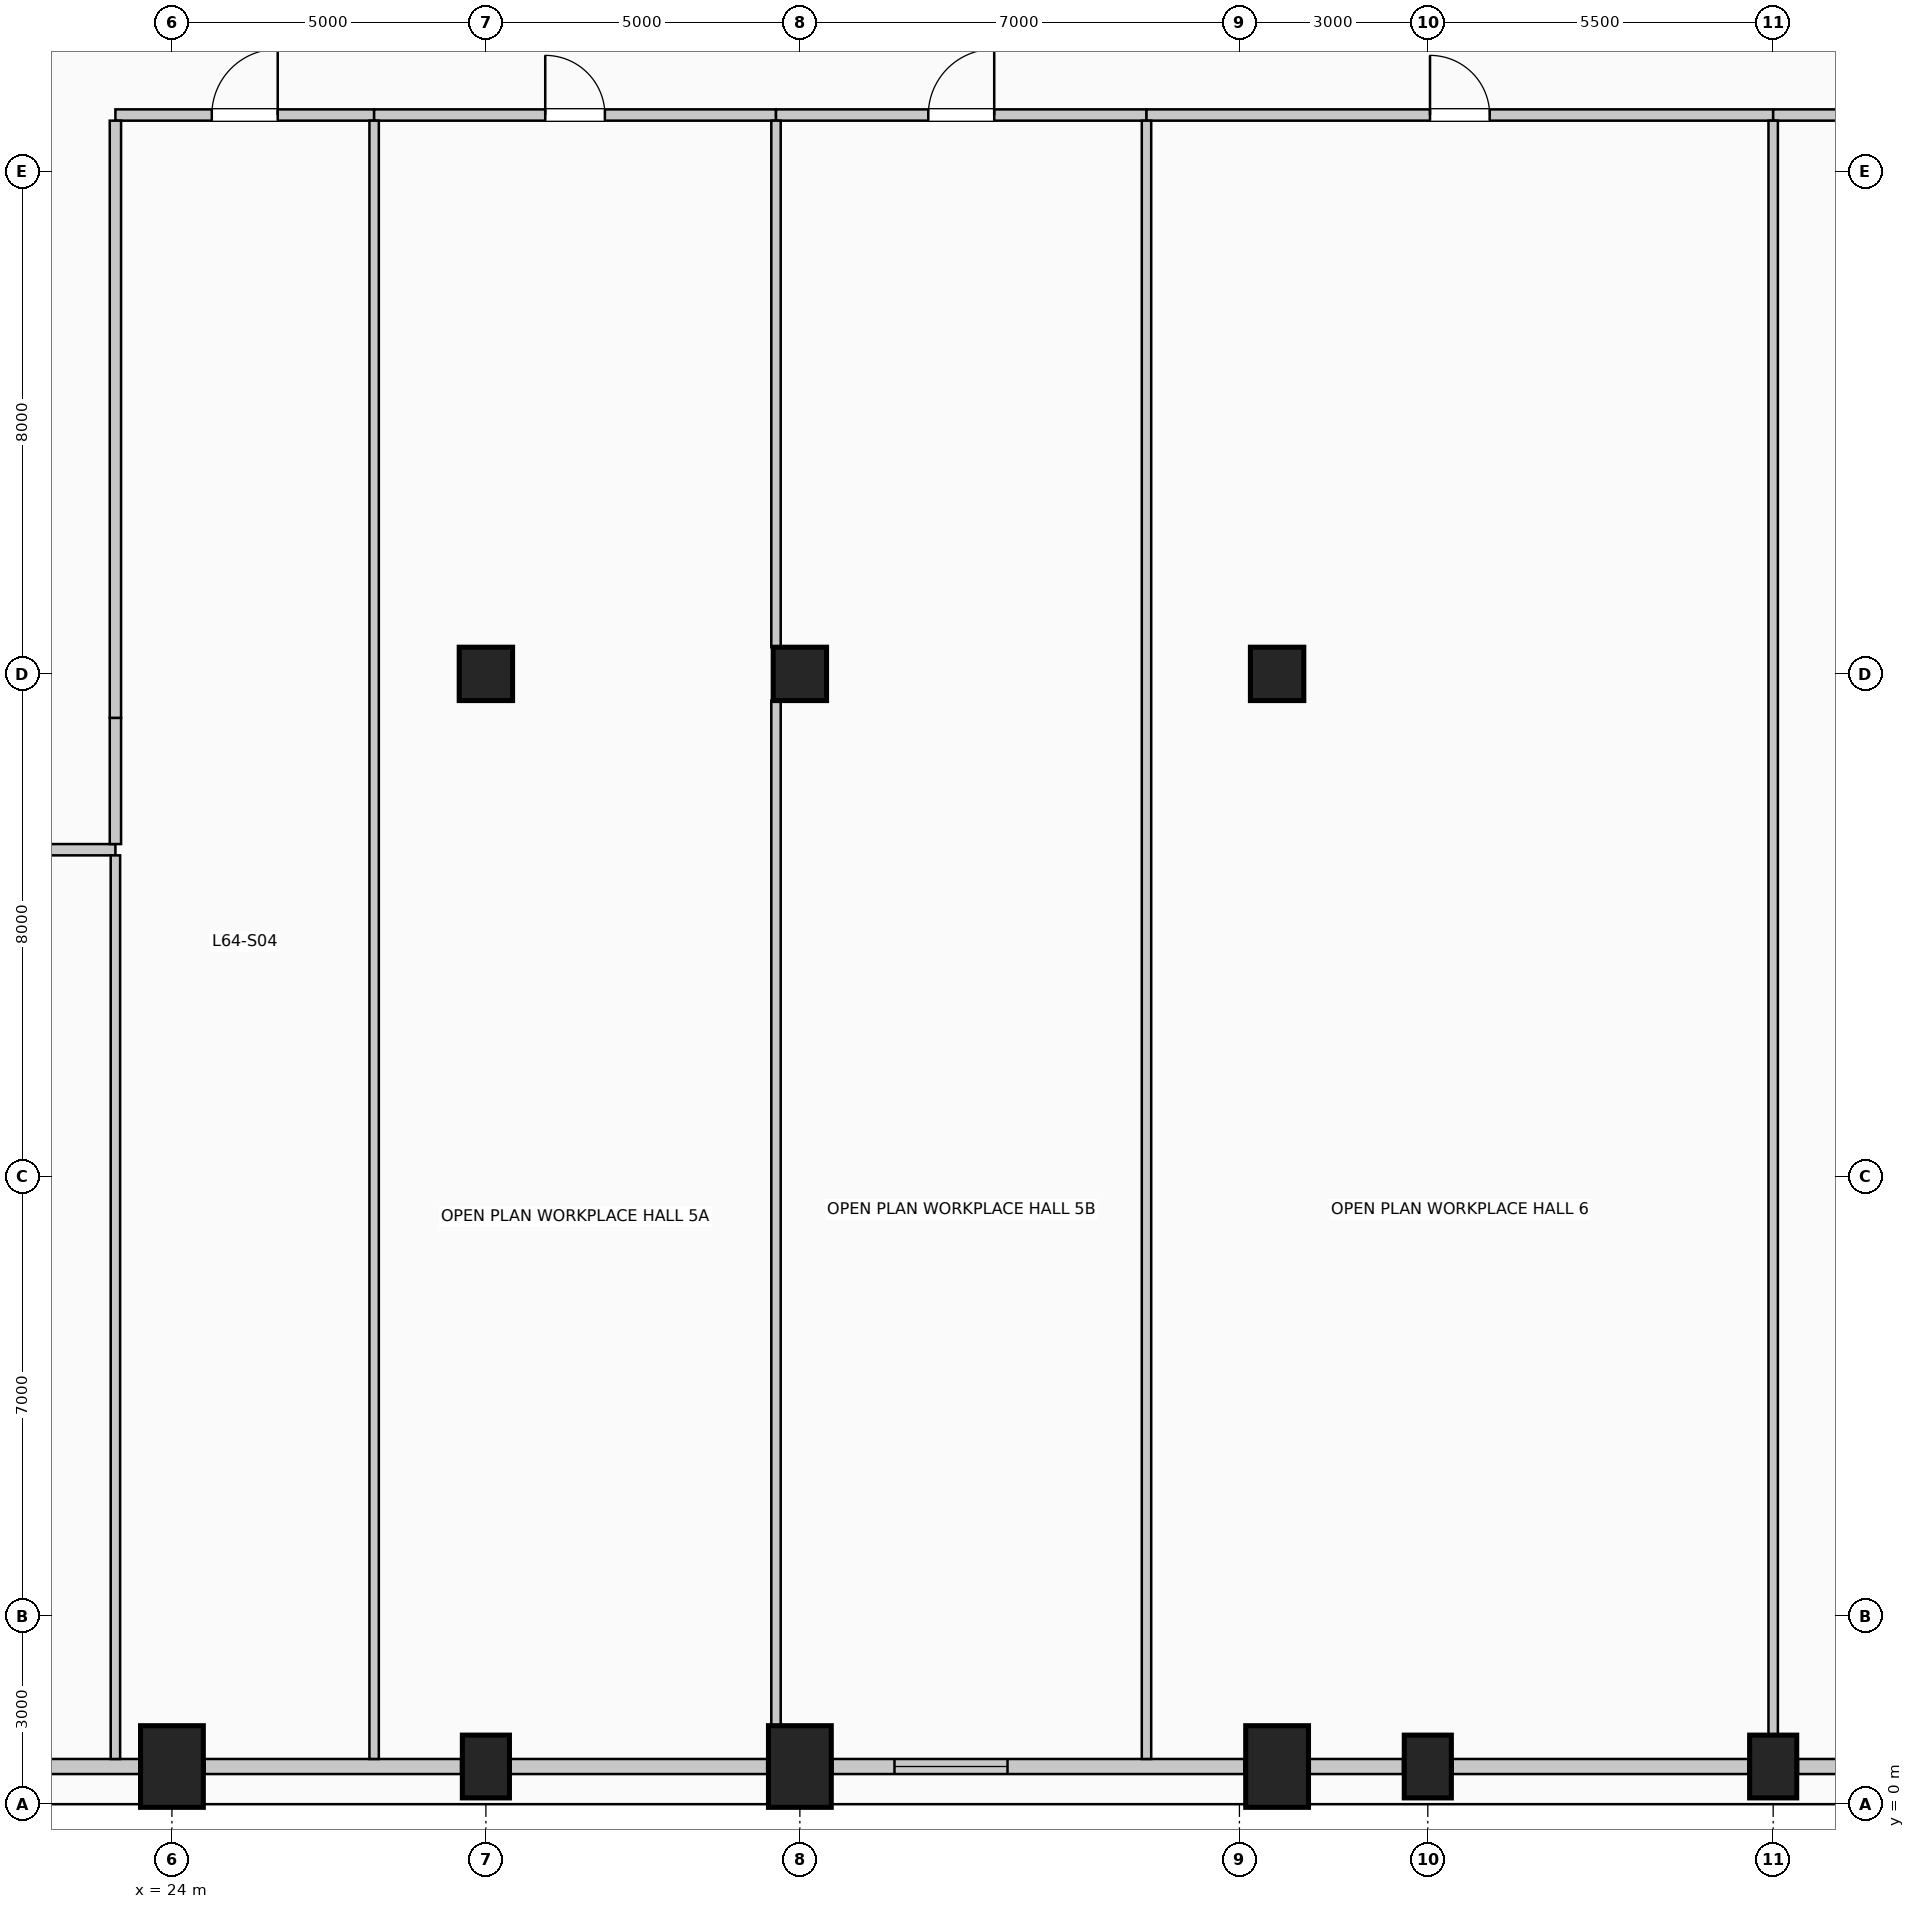
"""IFC4 building model, lengths in metres.
Left out: names, types, materials, properties, quantities, classifications, styles, units other than length and angle.
Written with IfcOpenShell. Run it as: python <this file> out.ifc"""

import sys

from ifc_helpers import new_model, si_unit, direction, frame, frame_2d, origin, origin_2d, place, context, subcontext, project, spatial, rectangle, circle, extrude, element, fill, save


model = new_model("IFC4")
c1 = context("Model", 3, precision=1e-05, world=origin(), true_north=direction((0.0, 1.0)))
c2 = subcontext(c1, "Body", "Model", "MODEL_VIEW")
j1 = project(units=[si_unit("LENGTHUNIT", "METRE"), si_unit("PLANEANGLEUNIT", "RADIAN")], contexts=[c1])
p1 = place(None, origin())
s1 = spatial("IfcSite", under=j1, at=p1, CompositionType="ELEMENT")
p2 = place(p1, origin())
s2 = spatial("IfcBuilding", under=s1, at=p2, CompositionType="ELEMENT")
p3 = place(p2, frame((0.0, 0.0, 264.6)))
s3 = spatial("IfcBuildingStorey", under=s2, at=p3, CompositionType="ELEMENT", Elevation=264.6)
p4 = place(p3, frame((24.0, 0.6, 0.0), z_axis=(0.0, 0.0, 1.0), x_axis=(1.0, 0.0, 0.0)))
e1 = element("IfcColumn", 1, at=p4, inside=s3, PredefinedType="COLUMN", context=c2, shape_type="SweptSolid", body=[
    extrude(rectangle(XDim=1.0, YDim=1.3, at=origin_2d()), origin(), (0.0, 0.0, 1.0), 4.0),
])
p5 = place(p3, frame((29.0, 0.6, 0.0), z_axis=(0.0, 0.0, 1.0), x_axis=(1.0, 0.0, 0.0)))
e2 = element("IfcColumn", 2, at=p5, inside=s3, PredefinedType="COLUMN", context=c2, shape_type="SweptSolid", body=[
    extrude(rectangle(XDim=0.75, YDim=1.0, at=origin_2d()), origin(), (0.0, 0.0, 1.0), 4.0),
])
for number, where, z_axis, x_axis in (
    (3, (34.0, 0.6, 0.0), (0.0, 0.0, 1.0), (1.0, 0.0, 0.0)),
    (4, (41.6, 0.6, 0.0), (0.0, 0.0, 1.0), (1.0, 0.0, 0.0)),
):
    element("IfcColumn", number, at=place(p3, frame(where, z_axis=z_axis, x_axis=x_axis)), inside=s3, PredefinedType="COLUMN", context=c2, shape_type="SweptSolid", body=[
        extrude(rectangle(XDim=1.0, YDim=1.3, at=origin_2d()), origin(), (0.0, 0.0, 1.0), 4.0),
    ])
for number, where, z_axis, x_axis in (
    (5, (44.0, 0.6, 0.0), (0.0, 0.0, 1.0), (1.0, 0.0, 0.0)),
    (6, (49.5, 0.6, 0.0), (0.0, 0.0, 1.0), (1.0, 0.0, 0.0)),
):
    element("IfcColumn", number, at=place(p3, frame(where, z_axis=z_axis, x_axis=x_axis)), inside=s3, PredefinedType="COLUMN", context=c2, shape_type="SweptSolid", body=[
        extrude(rectangle(XDim=0.75, YDim=1.0, at=origin_2d()), origin(), (0.0, 0.0, 1.0), 4.0),
    ])
for number, where, z_axis, x_axis in (
    (7, (29.0, 18.0, 0.0), (0.0, 0.0, 1.0), (1.0, 0.0, 0.0)),
    (8, (41.6, 18.0, 0.0), (0.0, 0.0, 1.0), (1.0, 0.0, 0.0)),
    (9, (34.0, 18.0, 0.0), (0.0, 0.0, 1.0), (1.0, 0.0, 0.0)),
):
    element("IfcColumn", number, at=place(p3, frame(where, z_axis=z_axis, x_axis=x_axis)), inside=s3, PredefinedType="COLUMN", context=c2, shape_type="SweptSolid", body=[
        extrude(circle(Radius=0.425, at=origin_2d()), origin(), (0.0, 0.0, 1.0), 4.0),
    ])
p6 = place(p3, frame((23.48, 0.6, 0.0), z_axis=(0.0, 0.0, 1.0), x_axis=(-1.0, 0.0, 0.0)))
e10 = element("IfcWall", 10, at=p6, inside=s3, PredefinedType="SOLIDWALL", context=c2, shape_type="SweptSolid", body=[
    extrude(rectangle(XDim=6.56, YDim=0.24, at=frame_2d((3.28, 0.0))), origin(), (0.0, 0.0, 1.0), 3.0),
])
p7 = place(p6, frame((3.773, 0.0, 0.42)))
e11 = element("IfcOpeningElement", 11, at=p7, cuts=e10, PredefinedType="OPENING", context=c2, shape_type="SweptSolid", body=[
    extrude(rectangle(XDim=1.8, YDim=2.2, at=frame_2d((0.9, 1.1))), frame((0.0, 0.13, 0.0), z_axis=(0.0, -1.0, 0.0), x_axis=(1.0, 0.0, 0.0)), (0.0, 0.0, 1.0), 0.26),
])
for number, where, z_axis, x_axis in (
    (12, (28.605, 0.6, 0.0), (0.0, 0.0, 1.0), (-1.0, 0.0, 0.0)),
    (13, (33.48, 0.6, 0.0), (0.0, 0.0, 1.0), (-1.0, 0.0, 0.0)),
):
    element("IfcWall", number, at=place(p3, frame(where, z_axis=z_axis, x_axis=x_axis)), inside=s3, PredefinedType="SOLIDWALL", context=c2, shape_type="SweptSolid", body=[
        extrude(rectangle(XDim=4.085, YDim=0.24, at=frame_2d((2.042, 0.0))), origin(), (0.0, 0.0, 1.0), 3.0),
    ])
p8 = place(p3, frame((41.08, 0.6, 0.0), z_axis=(0.0, 0.0, 1.0), x_axis=(-1.0, 0.0, 0.0)))
e14 = element("IfcWall", 14, at=p8, inside=s3, PredefinedType="SOLIDWALL", context=c2, shape_type="SweptSolid", body=[
    extrude(rectangle(XDim=6.56, YDim=0.24, at=frame_2d((3.28, 0.0))), origin(), (0.0, 0.0, 1.0), 3.0),
])
p9 = place(p8, frame((3.773, 0.0, 0.42)))
e15 = element("IfcOpeningElement", 15, at=p9, cuts=e14, PredefinedType="OPENING", context=c2, shape_type="SweptSolid", body=[
    extrude(rectangle(XDim=1.8, YDim=2.2, at=frame_2d((0.9, 1.1))), frame((0.0, 0.13, 0.0), z_axis=(0.0, -1.0, 0.0), x_axis=(1.0, 0.0, 0.0)), (0.0, 0.0, 1.0), 0.26),
])
p10 = place(p3, frame((43.605, 0.6, 0.0), z_axis=(0.0, 0.0, 1.0), x_axis=(-1.0, 0.0, 0.0)))
e16 = element("IfcWall", 16, at=p10, inside=s3, PredefinedType="SOLIDWALL", context=c2, shape_type="SweptSolid", body=[
    extrude(rectangle(XDim=1.485, YDim=0.24, at=frame_2d((0.742, 0.0))), origin(), (0.0, 0.0, 1.0), 3.0),
])
p11 = place(p3, frame((49.105, 0.6, 0.0), z_axis=(0.0, 0.0, 1.0), x_axis=(-1.0, 0.0, 0.0)))
e17 = element("IfcWall", 17, at=p11, inside=s3, PredefinedType="SOLIDWALL", context=c2, shape_type="SweptSolid", body=[
    extrude(rectangle(XDim=4.71, YDim=0.24, at=frame_2d((2.355, 0.0))), origin(), (0.0, 0.0, 1.0), 3.0),
])
p12 = place(p3, frame((54.005, 0.6, 0.0), z_axis=(0.0, 0.0, 1.0), x_axis=(-1.0, 0.0, 0.0)))
e18 = element("IfcWall", 18, at=p12, inside=s3, PredefinedType="SOLIDWALL", context=c2, shape_type="SweptSolid", body=[
    extrude(rectangle(XDim=4.11, YDim=0.24, at=frame_2d((2.055, 0.0))), origin(), (0.0, 0.0, 1.0), 3.0),
])
p13 = place(p12, frame((1.155, 0.0, 0.42)))
e19 = element("IfcOpeningElement", 19, at=p13, cuts=e18, PredefinedType="OPENING", context=c2, shape_type="SweptSolid", body=[
    extrude(rectangle(XDim=1.8, YDim=2.2, at=frame_2d((0.9, 1.1))), frame((0.0, 0.13, 0.0), z_axis=(0.0, -1.0, 0.0), x_axis=(1.0, 0.0, 0.0)), (0.0, 0.0, 1.0), 0.26),
])
p14 = place(p3, frame((16.4, 15.2, 0.0), z_axis=(0.0, 0.0, 1.0), x_axis=(1.0, 0.0, 0.0)))
e20 = element("IfcWall", 20, at=p14, inside=s3, PredefinedType="PARTITIONING", context=c2, shape_type="SweptSolid", body=[
    extrude(rectangle(XDim=6.7, YDim=0.18, at=frame_2d((3.35, 0.0))), origin(), (0.0, 0.0, 1.0), 3.75),
])
p15 = place(p14, frame((2.875, 0.0, 0.0)))
e21 = element("IfcOpeningElement", 21, at=p15, cuts=e20, PredefinedType="OPENING", context=c2, shape_type="SweptSolid", body=[
    extrude(rectangle(XDim=0.95, YDim=2.15, at=frame_2d((0.475, 1.075))), frame((0.0, 0.1, 0.0), z_axis=(0.0, -1.0, 0.0), x_axis=(1.0, 0.0, 0.0)), (0.0, 0.0, 1.0), 0.2),
])
p16 = place(p3, frame((23.1, 26.9, 0.0), z_axis=(0.0, 0.0, 1.0), x_axis=(1.0, 0.0, 0.0)))
e22 = element("IfcWall", 22, at=p16, inside=s3, PredefinedType="PARTITIONING", context=c2, shape_type="SweptSolid", body=[
    extrude(rectangle(XDim=4.12, YDim=0.18, at=frame_2d((2.06, 0.0))), origin(), (0.0, 0.0, 1.0), 3.75),
])
p17 = place(p16, frame((1.535, 0.0, 0.0)))
e23 = element("IfcOpeningElement", 23, at=p17, cuts=e22, PredefinedType="OPENING", context=c2, shape_type="SweptSolid", body=[
    extrude(rectangle(XDim=1.05, YDim=2.15, at=frame_2d((0.525, 1.075))), frame((0.0, 0.1, 0.0), z_axis=(0.0, -1.0, 0.0), x_axis=(1.0, 0.0, 0.0)), (0.0, 0.0, 1.0), 0.2),
])
p18 = place(p3, frame((27.22, 26.9, 0.0), z_axis=(0.0, 0.0, 1.0), x_axis=(1.0, 0.0, 0.0)))
e24 = element("IfcWall", 24, at=p18, inside=s3, PredefinedType="PARTITIONING", context=c2, shape_type="SweptSolid", body=[
    extrude(rectangle(XDim=6.4, YDim=0.18, at=frame_2d((3.2, 0.0))), origin(), (0.0, 0.0, 1.0), 3.75),
])
p19 = place(p18, frame((2.725, 0.0, 0.0)))
e25 = element("IfcOpeningElement", 25, at=p19, cuts=e24, PredefinedType="OPENING", context=c2, shape_type="SweptSolid", body=[
    extrude(rectangle(XDim=0.95, YDim=2.15, at=frame_2d((0.475, 1.075))), frame((0.0, 0.1, 0.0), z_axis=(0.0, -1.0, 0.0), x_axis=(1.0, 0.0, 0.0)), (0.0, 0.0, 1.0), 0.2),
])
p20 = place(p3, frame((33.62, 26.9, 0.0), z_axis=(0.0, 0.0, 1.0), x_axis=(1.0, 0.0, 0.0)))
e26 = element("IfcWall", 26, at=p20, inside=s3, PredefinedType="PARTITIONING", context=c2, shape_type="SweptSolid", body=[
    extrude(rectangle(XDim=5.9, YDim=0.18, at=frame_2d((2.95, 0.0))), origin(), (0.0, 0.0, 1.0), 3.75),
])
p21 = place(p20, frame((2.425, 0.0, 0.0)))
e27 = element("IfcOpeningElement", 27, at=p21, cuts=e26, PredefinedType="OPENING", context=c2, shape_type="SweptSolid", body=[
    extrude(rectangle(XDim=1.05, YDim=2.15, at=frame_2d((0.525, 1.075))), frame((0.0, 0.1, 0.0), z_axis=(0.0, -1.0, 0.0), x_axis=(1.0, 0.0, 0.0)), (0.0, 0.0, 1.0), 0.2),
])
p22 = place(p3, frame((39.52, 26.9, 0.0), z_axis=(0.0, 0.0, 1.0), x_axis=(1.0, 0.0, 0.0)))
e28 = element("IfcWall", 28, at=p22, inside=s3, PredefinedType="PARTITIONING", context=c2, shape_type="SweptSolid", body=[
    extrude(rectangle(XDim=9.98, YDim=0.18, at=frame_2d((4.99, 0.0))), origin(), (0.0, 0.0, 1.0), 3.75),
])
p23 = place(p22, frame((4.515, 0.0, 0.0)))
e29 = element("IfcOpeningElement", 29, at=p23, cuts=e28, PredefinedType="OPENING", context=c2, shape_type="SweptSolid", body=[
    extrude(rectangle(XDim=0.95, YDim=2.15, at=frame_2d((0.475, 1.075))), frame((0.0, 0.1, 0.0), z_axis=(0.0, -1.0, 0.0), x_axis=(1.0, 0.0, 0.0)), (0.0, 0.0, 1.0), 0.2),
])
p24 = place(p3, frame((49.5, 26.9, 0.0), z_axis=(0.0, 0.0, 1.0), x_axis=(1.0, 0.0, 0.0)))
e30 = element("IfcWall", 30, at=p24, inside=s3, PredefinedType="PARTITIONING", context=c2, shape_type="SweptSolid", body=[
    extrude(rectangle(XDim=7.78, YDim=0.18, at=frame_2d((3.89, 0.0))), origin(), (0.0, 0.0, 1.0), 3.75),
])
p25 = place(p24, frame((3.365, 0.0, 0.0)))
e31 = element("IfcOpeningElement", 31, at=p25, cuts=e30, PredefinedType="OPENING", context=c2, shape_type="SweptSolid", body=[
    extrude(rectangle(XDim=1.05, YDim=2.15, at=frame_2d((0.525, 1.075))), frame((0.0, 0.1, 0.0), z_axis=(0.0, -1.0, 0.0), x_axis=(1.0, 0.0, 0.0)), (0.0, 0.0, 1.0), 0.2),
])
p26 = place(p3, frame((23.1, 0.72, 0.0), z_axis=(0.0, 0.0, 1.0), x_axis=(0.0, 1.0, 0.0)))
e32 = element("IfcWall", 32, at=p26, inside=s3, PredefinedType="PARTITIONING", context=c2, shape_type="SweptSolid", body=[
    extrude(rectangle(XDim=14.39, YDim=0.15, at=frame_2d((7.195, 0.0))), origin(), (0.0, 0.0, 1.0), 3.75),
])
p27 = place(p3, frame((23.1, 15.29, 0.0), z_axis=(0.0, 0.0, 1.0), x_axis=(0.0, 1.0, 0.0)))
e33 = element("IfcWall", 33, at=p27, inside=s3, PredefinedType="PARTITIONING", context=c2, shape_type="SweptSolid", body=[
    extrude(rectangle(XDim=2.01, YDim=0.18, at=frame_2d((1.005, 0.0))), origin(), (0.0, 0.0, 1.0), 3.75),
])
p28 = place(p3, frame((23.1, 17.3, 0.0), z_axis=(0.0, 0.0, 1.0), x_axis=(0.0, 1.0, 0.0)))
e34 = element("IfcWall", 34, at=p28, inside=s3, PredefinedType="PARTITIONING", context=c2, shape_type="SweptSolid", body=[
    extrude(rectangle(XDim=9.51, YDim=0.18, at=frame_2d((4.755, 0.0))), origin(), (0.0, 0.0, 1.0), 3.75),
])
p29 = place(p3, frame((27.22, 0.72, 0.0), z_axis=(0.0, 0.0, 1.0), x_axis=(0.0, 1.0, 0.0)))
e35 = element("IfcWall", 35, at=p29, inside=s3, PredefinedType="PARTITIONING", context=c2, shape_type="SweptSolid", body=[
    extrude(rectangle(XDim=26.09, YDim=0.15, at=frame_2d((13.045, 0.0))), origin(), (0.0, 0.0, 1.0), 3.75),
])
p30 = place(p3, frame((33.62, 1.25, 0.0), z_axis=(0.0, 0.0, 1.0), x_axis=(0.0, 1.0, 0.0)))
e36 = element("IfcWall", 36, at=p30, inside=s3, PredefinedType="PARTITIONING", context=c2, shape_type="SweptSolid", body=[
    extrude(rectangle(XDim=16.325, YDim=0.15, at=frame_2d((8.163, 0.0))), origin(), (0.0, 0.0, 1.0), 3.75),
])
p31 = place(p3, frame((33.62, 18.425, 0.0), z_axis=(0.0, 0.0, 1.0), x_axis=(0.0, 1.0, 0.0)))
e37 = element("IfcWall", 37, at=p31, inside=s3, PredefinedType="PARTITIONING", context=c2, shape_type="SweptSolid", body=[
    extrude(rectangle(XDim=8.385, YDim=0.15, at=frame_2d((4.192, 0.0))), origin(), (0.0, 0.0, 1.0), 3.75),
])
p32 = place(p3, frame((39.52, 0.72, 0.0), z_axis=(0.0, 0.0, 1.0), x_axis=(0.0, 1.0, 0.0)))
e38 = element("IfcWall", 38, at=p32, inside=s3, PredefinedType="PARTITIONING", context=c2, shape_type="SweptSolid", body=[
    extrude(rectangle(XDim=26.09, YDim=0.15, at=frame_2d((13.045, 0.0))), origin(), (0.0, 0.0, 1.0), 3.75),
])
p33 = place(p3, frame((49.5, 1.1, 0.0), z_axis=(0.0, 0.0, 1.0), x_axis=(0.0, 1.0, 0.0)))
e39 = element("IfcWall", 39, at=p33, inside=s3, PredefinedType="PARTITIONING", context=c2, shape_type="SweptSolid", body=[
    extrude(rectangle(XDim=25.71, YDim=0.15, at=frame_2d((12.855, 0.0))), origin(), (0.0, 0.0, 1.0), 3.75),
])
p34 = place(p9, origin())
e40 = element("IfcWindow", 40, at=p34, inside=s3, PartitioningType="SINGLE_PANEL", PredefinedType="WINDOW", context=c2, shape_type="SweptSolid", body=[
    extrude(rectangle(XDim=1.8, YDim=2.2, at=frame_2d((0.9, 1.1))), frame((0.0, 0.03, 0.0), z_axis=(0.0, -1.0, 0.0), x_axis=(1.0, 0.0, 0.0)), (0.0, 0.0, 1.0), 0.06),
])
fill(e15, e40)
p35 = place(p17, origin())
e41 = element("IfcDoor", 41, at=p35, inside=s3, OperationType="SINGLE_SWING_RIGHT", PredefinedType="DOOR", context=c2, shape_type="SweptSolid", body=[
    extrude(rectangle(XDim=1.05, YDim=2.15, at=frame_2d((0.525, 1.075))), frame((0.0, 0.025, 0.0), z_axis=(0.0, -1.0, 0.0), x_axis=(1.0, 0.0, 0.0)), (0.0, 0.0, 1.0), 0.05),
])
fill(e23, e41)
p36 = place(p19, origin())
e42 = element("IfcDoor", 42, at=p36, inside=s3, OperationType="SINGLE_SWING_LEFT", PredefinedType="DOOR", context=c2, shape_type="SweptSolid", body=[
    extrude(rectangle(XDim=0.95, YDim=2.15, at=frame_2d((0.475, 1.075))), frame((0.0, 0.025, 0.0), z_axis=(0.0, -1.0, 0.0), x_axis=(1.0, 0.0, 0.0)), (0.0, 0.0, 1.0), 0.05),
])
fill(e25, e42)
p37 = place(p21, origin())
e43 = element("IfcDoor", 43, at=p37, inside=s3, OperationType="SINGLE_SWING_RIGHT", PredefinedType="DOOR", context=c2, shape_type="SweptSolid", body=[
    extrude(rectangle(XDim=1.05, YDim=2.15, at=frame_2d((0.525, 1.075))), frame((0.0, 0.025, 0.0), z_axis=(0.0, -1.0, 0.0), x_axis=(1.0, 0.0, 0.0)), (0.0, 0.0, 1.0), 0.05),
])
fill(e27, e43)
p38 = place(p23, origin())
e44 = element("IfcDoor", 44, at=p38, inside=s3, OperationType="SINGLE_SWING_LEFT", PredefinedType="DOOR", context=c2, shape_type="SweptSolid", body=[
    extrude(rectangle(XDim=0.95, YDim=2.15, at=frame_2d((0.475, 1.075))), frame((0.0, 0.025, 0.0), z_axis=(0.0, -1.0, 0.0), x_axis=(1.0, 0.0, 0.0)), (0.0, 0.0, 1.0), 0.05),
])
fill(e29, e44)
save(model, sys.argv[1])
